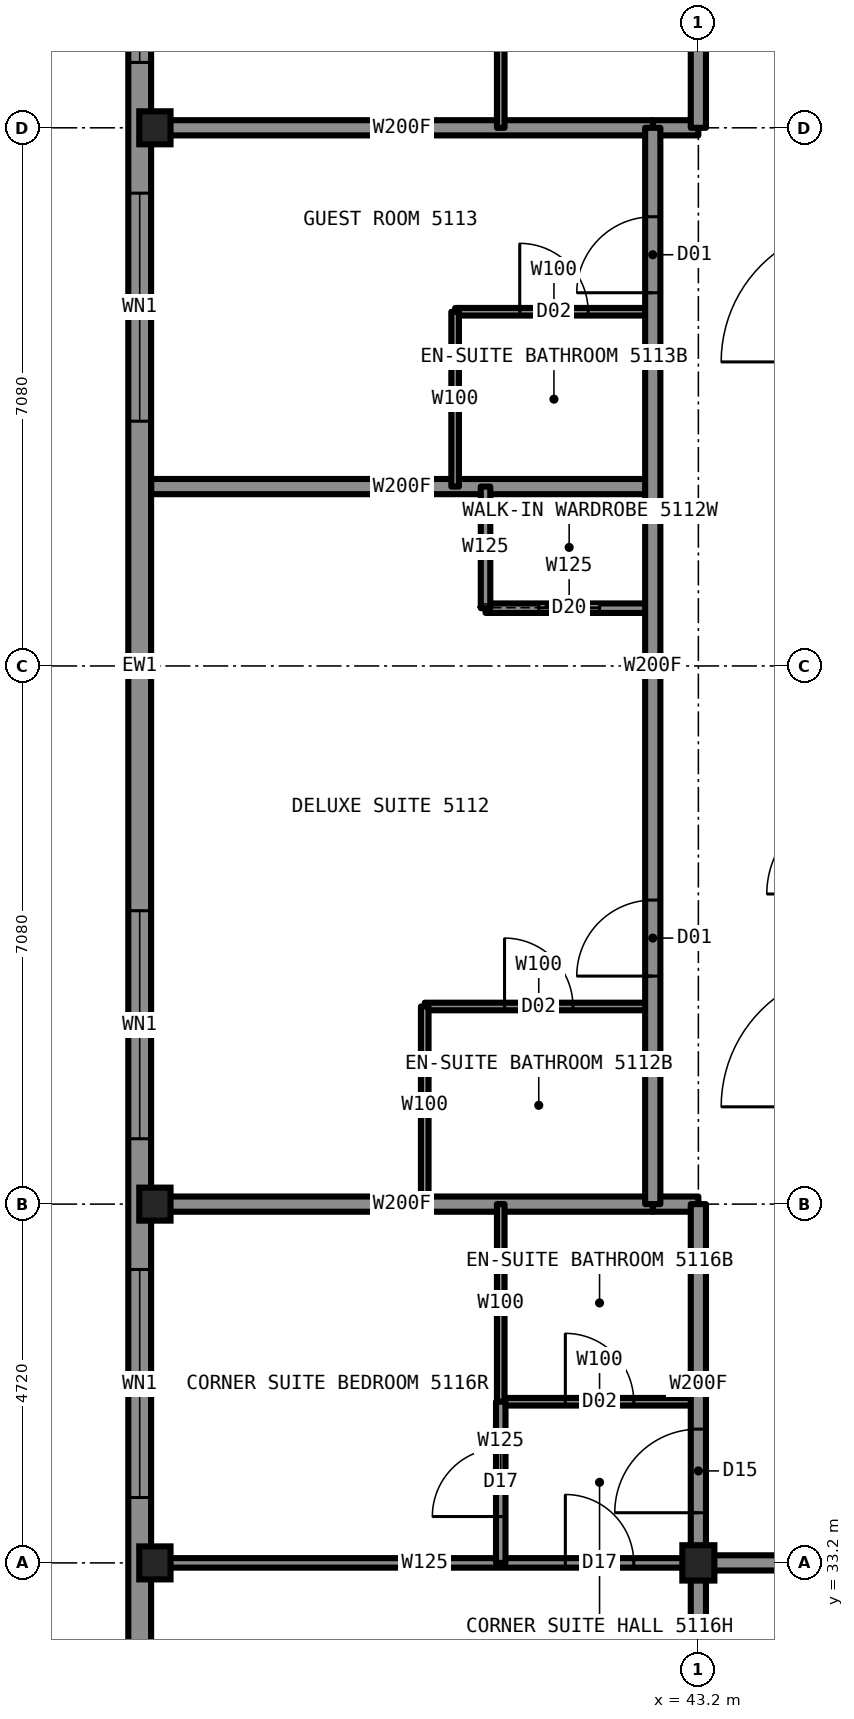
"""IFC4 building model, lengths in metres.
Left out: names, types, materials, properties, quantities, classifications, styles, units other than length and angle.
Written with IfcOpenShell. Run it as: python <this file> out.ifc"""

import sys

from ifc_helpers import new_model, si_unit, direction, frame, frame_2d, origin, origin_2d, place, context, subcontext, project, spatial, rectangle, i_section, extrude, element, fill, save


model = new_model("IFC4")
c1 = context("Model", 3, precision=1e-05, world=origin(), true_north=direction((0.0, 1.0)))
c2 = subcontext(c1, "Body", "Model", "MODEL_VIEW")
j1 = project(units=[si_unit("LENGTHUNIT", "METRE"), si_unit("PLANEANGLEUNIT", "RADIAN")], contexts=[c1])
p1 = place(None, origin())
s1 = spatial("IfcSite", under=j1, at=p1, CompositionType="ELEMENT")
p2 = place(p1, origin())
s2 = spatial("IfcBuilding", under=s1, at=p2, CompositionType="ELEMENT")
p3 = place(p2, frame((0.0, 0.0, 182.8)))
s3 = spatial("IfcBuildingStorey", under=s2, at=p3, CompositionType="ELEMENT", Elevation=182.8)
for number, where, z_axis, x_axis in (
    (1, (36.05, 33.2, 0.0), (0.0, 0.0, 1.0), (1.0, 0.0, 0.0)),
    (2, (36.05, 37.92, 0.0), (0.0, 0.0, 1.0), (1.0, 0.0, 0.0)),
    (3, (36.05, 52.08, 0.0), (0.0, 0.0, 1.0), (1.0, 0.0, 0.0)),
):
    element("IfcColumn", number, at=place(p3, frame(where, z_axis=z_axis, x_axis=x_axis)), inside=s3, PredefinedType="COLUMN", context=c2, shape_type="SweptSolid", body=[
        extrude(i_section(OverallWidth=0.411, OverallDepth=0.434, WebThickness=0.036, FlangeThickness=0.057, at=origin_2d()), origin(), (0.0, 0.0, 1.0), 3.5),
    ])
p4 = place(p3, frame((43.2, 33.2, 0.0), z_axis=(0.0, 0.0, 1.0), x_axis=(1.0, 0.0, 0.0)))
e4 = element("IfcColumn", 4, at=p4, inside=s3, PredefinedType="COLUMN", context=c2, shape_type="SweptSolid", body=[
    extrude(i_section(OverallWidth=0.422, OverallDepth=0.465, WebThickness=0.045, FlangeThickness=0.073, at=origin_2d()), origin(), (0.0, 0.0, 1.0), 3.5),
])
p5 = place(p3, frame((43.2, 33.2, 0.0), z_axis=(0.0, 0.0, 1.0), x_axis=(1.0, 0.0, 0.0)))
e5 = element("IfcWall", 5, at=p5, inside=s3, PredefinedType="PARTITIONING", context=c2, shape_type="SweptSolid", body=[
    extrude(rectangle(XDim=23.6, YDim=0.2, at=frame_2d((11.8, 0.0))), origin(), (0.0, 0.0, 1.0), 3.33),
])
p6 = place(p5, frame((3.0, 0.0, 0.0)))
e6 = element("IfcOpeningElement", 6, at=p6, cuts=e5, PredefinedType="OPENING", context=c2, shape_type="SweptSolid", body=[
    extrude(rectangle(XDim=1.0, YDim=2.2, at=frame_2d((0.5, 1.1))), frame((0.0, 0.11, 0.0), z_axis=(0.0, -1.0, 0.0), x_axis=(1.0, 0.0, 0.0)), (0.0, 0.0, 1.0), 0.22),
])
p7 = place(p5, frame((11.99, 0.0, 0.0)))
e7 = element("IfcOpeningElement", 7, at=p7, cuts=e5, PredefinedType="OPENING", context=c2, shape_type="SweptSolid", body=[
    extrude(rectangle(XDim=1.0, YDim=2.2, at=frame_2d((0.5, 1.1))), frame((0.0, 0.11, 0.0), z_axis=(0.0, -1.0, 0.0), x_axis=(1.0, 0.0, 0.0)), (0.0, 0.0, 1.0), 0.22),
])
p8 = place(p5, frame((16.71, 0.0, 0.0)))
e8 = element("IfcOpeningElement", 8, at=p8, cuts=e5, PredefinedType="OPENING", context=c2, shape_type="SweptSolid", body=[
    extrude(rectangle(XDim=1.0, YDim=2.2, at=frame_2d((0.5, 1.1))), frame((0.0, 0.11, 0.0), z_axis=(0.0, -1.0, 0.0), x_axis=(1.0, 0.0, 0.0)), (0.0, 0.0, 1.0), 0.22),
])
p9 = place(p5, frame((19.28, 0.0, 0.0)))
e9 = element("IfcOpeningElement", 9, at=p9, cuts=e5, PredefinedType="OPENING", context=c2, shape_type="SweptSolid", body=[
    extrude(rectangle(XDim=1.0, YDim=2.2, at=frame_2d((0.5, 1.1))), frame((0.0, 0.11, 0.0), z_axis=(0.0, -1.0, 0.0), x_axis=(1.0, 0.0, 0.0)), (0.0, 0.0, 1.0), 0.22),
])
p10 = place(p3, frame((36.0, 33.2, 0.0), z_axis=(0.0, 0.0, 1.0), x_axis=(1.0, 0.0, 0.0)))
e10 = element("IfcWall", 10, at=p10, inside=s3, PredefinedType="PARTITIONING", context=c2, shape_type="SweptSolid", body=[
    extrude(rectangle(XDim=7.2, YDim=0.125, at=frame_2d((3.6, 0.0))), origin(), (0.0, 0.0, 1.0), 2.573),
])
p11 = place(p10, frame((5.45, 0.0, 0.0)))
e11 = element("IfcOpeningElement", 11, at=p11, cuts=e10, PredefinedType="OPENING", context=c2, shape_type="SweptSolid", body=[
    extrude(rectangle(XDim=0.9, YDim=2.2, at=frame_2d((0.45, 1.1))), frame((0.0, 0.073, 0.0), z_axis=(0.0, -1.0, 0.0), x_axis=(1.0, 0.0, 0.0)), (0.0, 0.0, 1.0), 0.145),
])
p12 = place(p3, frame((39.6, 40.52, 0.0), z_axis=(0.0, 0.0, 1.0), x_axis=(1.0, 0.0, 0.0)))
e12 = element("IfcWall", 12, at=p12, inside=s3, PredefinedType="PARTITIONING", context=c2, shape_type="SweptSolid", body=[
    extrude(rectangle(XDim=3.0, YDim=0.1, at=frame_2d((1.5, 0.0))), origin(), (0.0, 0.0, 1.0), 3.33),
])
p13 = place(p12, frame((1.05, 0.0, 0.0)))
e13 = element("IfcOpeningElement", 13, at=p13, cuts=e12, PredefinedType="OPENING", context=c2, shape_type="SweptSolid", body=[
    extrude(rectangle(XDim=0.9, YDim=2.1, at=frame_2d((0.45, 1.05))), frame((0.0, 0.06, 0.0), z_axis=(0.0, -1.0, 0.0), x_axis=(1.0, 0.0, 0.0)), (0.0, 0.0, 1.0), 0.12),
])
p14 = place(p3, frame((42.6, 37.92, 0.0), z_axis=(0.0, 0.0, 1.0), x_axis=(1.0, 0.0, 0.0)))
e14 = element("IfcWall", 14, at=p14, inside=s3, PredefinedType="PARTITIONING", context=c2, shape_type="SweptSolid", body=[
    extrude(rectangle(XDim=0.6, YDim=0.2, at=frame_2d((0.3, 0.0))), origin(), (0.0, 0.0, 1.0), 2.573),
])
p15 = place(p3, frame((36.0, 37.92, 0.0), z_axis=(0.0, 0.0, 1.0), x_axis=(1.0, 0.0, 0.0)))
e15 = element("IfcWall", 15, at=p15, inside=s3, PredefinedType="PARTITIONING", context=c2, shape_type="SweptSolid", body=[
    extrude(rectangle(XDim=6.6, YDim=0.2, at=frame_2d((3.3, 0.0))), origin(), (0.0, 0.0, 1.0), 2.573),
])
p16 = place(p3, frame((40.6, 35.32, 0.0), z_axis=(0.0, 0.0, 1.0), x_axis=(1.0, 0.0, 0.0)))
e16 = element("IfcWall", 16, at=p16, inside=s3, PredefinedType="PARTITIONING", context=c2, shape_type="SweptSolid", body=[
    extrude(rectangle(XDim=2.6, YDim=0.1, at=frame_2d((1.3, 0.0))), origin(), (0.0, 0.0, 1.0), 3.33),
])
p17 = place(p16, frame((0.85, 0.0, 0.0)))
e17 = element("IfcOpeningElement", 17, at=p17, cuts=e16, PredefinedType="OPENING", context=c2, shape_type="SweptSolid", body=[
    extrude(rectangle(XDim=0.9, YDim=2.1, at=frame_2d((0.45, 1.05))), frame((0.0, 0.06, 0.0), z_axis=(0.0, -1.0, 0.0), x_axis=(1.0, 0.0, 0.0)), (0.0, 0.0, 1.0), 0.12),
])
p18 = place(p3, frame((40.4, 45.76, 0.0), z_axis=(0.0, 0.0, 1.0), x_axis=(1.0, 0.0, 0.0)))
e18 = element("IfcWall", 18, at=p18, inside=s3, PredefinedType="PARTITIONING", context=c2, shape_type="SweptSolid", body=[
    extrude(rectangle(XDim=2.2, YDim=0.125, at=frame_2d((1.1, 0.0))), origin(), (0.0, 0.0, 1.0), 3.33),
])
p19 = place(p18, frame((0.7, 0.0, 0.0)))
e19 = element("IfcOpeningElement", 19, at=p19, cuts=e18, PredefinedType="OPENING", context=c2, shape_type="SweptSolid", body=[
    extrude(rectangle(XDim=0.8, YDim=2.1, at=frame_2d((0.4, 1.05))), frame((0.0, 0.073, 0.0), z_axis=(0.0, -1.0, 0.0), x_axis=(1.0, 0.0, 0.0)), (0.0, 0.0, 1.0), 0.145),
])
p20 = place(p3, frame((36.0, 47.36, 0.0), z_axis=(0.0, 0.0, 1.0), x_axis=(1.0, 0.0, 0.0)))
e20 = element("IfcWall", 20, at=p20, inside=s3, PredefinedType="PARTITIONING", context=c2, shape_type="SweptSolid", body=[
    extrude(rectangle(XDim=6.6, YDim=0.2, at=frame_2d((3.3, 0.0))), origin(), (0.0, 0.0, 1.0), 2.73),
])
p21 = place(p3, frame((40.0, 49.66, 0.0), z_axis=(0.0, 0.0, 1.0), x_axis=(1.0, 0.0, 0.0)))
e21 = element("IfcWall", 21, at=p21, inside=s3, PredefinedType="PARTITIONING", context=c2, shape_type="SweptSolid", body=[
    extrude(rectangle(XDim=2.6, YDim=0.1, at=frame_2d((1.3, 0.0))), origin(), (0.0, 0.0, 1.0), 2.73),
])
p22 = place(p21, frame((0.85, 0.0, 0.0)))
e22 = element("IfcOpeningElement", 22, at=p22, cuts=e21, PredefinedType="OPENING", context=c2, shape_type="SweptSolid", body=[
    extrude(rectangle(XDim=0.9, YDim=2.1, at=frame_2d((0.45, 1.05))), frame((0.0, 0.06, 0.0), z_axis=(0.0, -1.0, 0.0), x_axis=(1.0, 0.0, 0.0)), (0.0, 0.0, 1.0), 0.12),
])
p23 = place(p3, frame((42.6, 52.08, 0.0), z_axis=(0.0, 0.0, 1.0), x_axis=(1.0, 0.0, 0.0)))
e23 = element("IfcWall", 23, at=p23, inside=s3, PredefinedType="PARTITIONING", context=c2, shape_type="SweptSolid", body=[
    extrude(rectangle(XDim=0.6, YDim=0.2, at=frame_2d((0.3, 0.0))), origin(), (0.0, 0.0, 1.0), 2.573),
])
p24 = place(p3, frame((36.0, 52.08, 0.0), z_axis=(0.0, 0.0, 1.0), x_axis=(1.0, 0.0, 0.0)))
e24 = element("IfcWall", 24, at=p24, inside=s3, PredefinedType="PARTITIONING", context=c2, shape_type="SweptSolid", body=[
    extrude(rectangle(XDim=6.6, YDim=0.2, at=frame_2d((3.3, 0.0))), origin(), (0.0, 0.0, 1.0), 2.573),
])
p25 = place(p3, frame((43.2, 33.2, 0.0), z_axis=(0.0, 0.0, 1.0), x_axis=(0.0, 1.0, 0.0)))
e25 = element("IfcWall", 25, at=p25, inside=s3, PredefinedType="PARTITIONING", context=c2, shape_type="SweptSolid", body=[
    extrude(rectangle(XDim=4.72, YDim=0.2, at=frame_2d((2.36, 0.0))), origin(), (0.0, 0.0, 1.0), 3.33),
])
p26 = place(p25, frame((0.66, 0.0, 0.0)))
e26 = element("IfcOpeningElement", 26, at=p26, cuts=e25, PredefinedType="OPENING", context=c2, shape_type="SweptSolid", body=[
    extrude(rectangle(XDim=1.1, YDim=2.2, at=frame_2d((0.55, 1.1))), frame((0.0, 0.11, 0.0), z_axis=(0.0, -1.0, 0.0), x_axis=(1.0, 0.0, 0.0)), (0.0, 0.0, 1.0), 0.22),
])
p27 = place(p3, frame((43.2, 52.08, 0.0), z_axis=(0.0, 0.0, 1.0), x_axis=(0.0, 1.0, 0.0)))
e27 = element("IfcWall", 27, at=p27, inside=s3, PredefinedType="PARTITIONING", context=c2, shape_type="SweptSolid", body=[
    extrude(rectangle(XDim=4.7, YDim=0.2, at=frame_2d((2.35, 0.0))), origin(), (0.0, 0.0, 1.0), 3.33),
])
p28 = place(p27, frame((3.17, 0.0, 0.0)))
e28 = element("IfcOpeningElement", 28, at=p28, cuts=e27, PredefinedType="OPENING", context=c2, shape_type="SweptSolid", body=[
    extrude(rectangle(XDim=1.1, YDim=2.2, at=frame_2d((0.55, 1.1))), frame((0.0, 0.11, 0.0), z_axis=(0.0, -1.0, 0.0), x_axis=(1.0, 0.0, 0.0)), (0.0, 0.0, 1.0), 0.22),
])
p29 = place(p3, frame((43.2, 26.0, 0.0), z_axis=(0.0, 0.0, 1.0), x_axis=(0.0, 1.0, 0.0)))
e29 = element("IfcWall", 29, at=p29, inside=s3, PredefinedType="PARTITIONING", context=c2, shape_type="SweptSolid", body=[
    extrude(rectangle(XDim=7.2, YDim=0.2, at=frame_2d((3.6, 0.0))), origin(), (0.0, 0.0, 1.0), 2.573),
])
p30 = place(p3, frame((42.6, 37.92, 0.0), z_axis=(0.0, 0.0, 1.0), x_axis=(0.0, 1.0, 0.0)))
e30 = element("IfcWall", 30, at=p30, inside=s3, PredefinedType="PARTITIONING", context=c2, shape_type="SweptSolid", body=[
    extrude(rectangle(XDim=14.16, YDim=0.2, at=frame_2d((7.08, 0.0))), origin(), (0.0, 0.0, 1.0), 3.33),
])
p31 = place(p30, frame((3.0, 0.0, 0.0)))
e31 = element("IfcOpeningElement", 31, at=p31, cuts=e30, PredefinedType="OPENING", context=c2, shape_type="SweptSolid", body=[
    extrude(rectangle(XDim=1.0, YDim=2.2, at=frame_2d((0.5, 1.1))), frame((0.0, 0.11, 0.0), z_axis=(0.0, -1.0, 0.0), x_axis=(1.0, 0.0, 0.0)), (0.0, 0.0, 1.0), 0.22),
])
p32 = place(p30, frame((11.99, 0.0, 0.0)))
e32 = element("IfcOpeningElement", 32, at=p32, cuts=e30, PredefinedType="OPENING", context=c2, shape_type="SweptSolid", body=[
    extrude(rectangle(XDim=1.0, YDim=2.2, at=frame_2d((0.5, 1.1))), frame((0.0, 0.11, 0.0), z_axis=(0.0, -1.0, 0.0), x_axis=(1.0, 0.0, 0.0)), (0.0, 0.0, 1.0), 0.22),
])
for number, where, z_axis, x_axis in (
    (33, (40.6, 35.32, 0.0), (0.0, 0.0, 1.0), (0.0, 1.0, 0.0)),
    (34, (40.6, 52.08, 0.0), (0.0, 0.0, 1.0), (0.0, 1.0, 0.0)),
):
    element("IfcWall", number, at=place(p3, frame(where, z_axis=z_axis, x_axis=x_axis)), inside=s3, PredefinedType="PARTITIONING", context=c2, shape_type="SweptSolid", body=[
        extrude(rectangle(XDim=2.6, YDim=0.1, at=frame_2d((1.3, 0.0))), origin(), (0.0, 0.0, 1.0), 3.33),
    ])
p33 = place(p3, frame((40.6, 33.2, 0.0), z_axis=(0.0, 0.0, 1.0), x_axis=(0.0, 1.0, 0.0)))
e35 = element("IfcWall", 35, at=p33, inside=s3, PredefinedType="PARTITIONING", context=c2, shape_type="SweptSolid", body=[
    extrude(rectangle(XDim=2.12, YDim=0.125, at=frame_2d((1.06, 0.0))), origin(), (0.0, 0.0, 1.0), 3.33),
])
p34 = place(p33, frame((0.61, 0.0, 0.0)))
e36 = element("IfcOpeningElement", 36, at=p34, cuts=e35, PredefinedType="OPENING", context=c2, shape_type="SweptSolid", body=[
    extrude(rectangle(XDim=0.9, YDim=2.2, at=frame_2d((0.45, 1.1))), frame((0.0, 0.073, 0.0), z_axis=(0.0, -1.0, 0.0), x_axis=(1.0, 0.0, 0.0)), (0.0, 0.0, 1.0), 0.145),
])
p35 = place(p3, frame((40.4, 45.76, 0.0), z_axis=(0.0, 0.0, 1.0), x_axis=(0.0, 1.0, 0.0)))
e37 = element("IfcWall", 37, at=p35, inside=s3, PredefinedType="PARTITIONING", context=c2, shape_type="SweptSolid", body=[
    extrude(rectangle(XDim=1.6, YDim=0.125, at=frame_2d((0.8, 0.0))), origin(), (0.0, 0.0, 1.0), 3.33),
])
p36 = place(p3, frame((40.0, 47.36, 0.0), z_axis=(0.0, 0.0, 1.0), x_axis=(0.0, 1.0, 0.0)))
e38 = element("IfcWall", 38, at=p36, inside=s3, PredefinedType="PARTITIONING", context=c2, shape_type="SweptSolid", body=[
    extrude(rectangle(XDim=2.3, YDim=0.1, at=frame_2d((1.15, 0.0))), origin(), (0.0, 0.0, 1.0), 3.33),
])
p37 = place(p3, frame((39.6, 37.92, 0.0), z_axis=(0.0, 0.0, 1.0), x_axis=(0.0, 1.0, 0.0)))
e39 = element("IfcWall", 39, at=p37, inside=s3, PredefinedType="PARTITIONING", context=c2, shape_type="SweptSolid", body=[
    extrude(rectangle(XDim=2.6, YDim=0.1, at=frame_2d((1.3, 0.0))), origin(), (0.0, 0.0, 1.0), 3.33),
])
p38 = place(p3, frame((35.85, 58.8, 0.0), z_axis=(0.0, 0.0, 1.0), x_axis=(0.0, -1.0, 0.0)))
e40 = element("IfcWall", 40, at=p38, inside=s3, PredefinedType="SOLIDWALL", context=c2, shape_type="SweptSolid", body=[
    extrude(rectangle(XDim=27.6, YDim=0.3, at=frame_2d((13.8, 0.0))), origin(), (0.0, 0.0, 1.0), 2.83),
])
p39 = place(p38, frame((2.86, 0.0, 0.3)))
e41 = element("IfcOpeningElement", 41, at=p39, cuts=e40, PredefinedType="OPENING", context=c2, shape_type="SweptSolid", body=[
    extrude(rectangle(XDim=3.0, YDim=2.0, at=frame_2d((1.5, 1.0))), frame((0.0, 0.16, 0.0), z_axis=(0.0, -1.0, 0.0), x_axis=(1.0, 0.0, 0.0)), (0.0, 0.0, 1.0), 0.32),
])
p40 = place(p38, frame((9.88, 0.0, 0.3)))
e42 = element("IfcOpeningElement", 42, at=p40, cuts=e40, PredefinedType="OPENING", context=c2, shape_type="SweptSolid", body=[
    extrude(rectangle(XDim=0.7, YDim=1.1, at=frame_2d((0.35, 0.55))), frame((0.0, 0.16, 0.0), z_axis=(0.0, -1.0, 0.0), x_axis=(1.0, 0.0, 0.0)), (0.0, 0.0, 1.0), 0.32),
])
p41 = place(p38, frame((12.3, 0.0, 0.3)))
e43 = element("IfcOpeningElement", 43, at=p41, cuts=e40, PredefinedType="OPENING", context=c2, shape_type="SweptSolid", body=[
    extrude(rectangle(XDim=3.0, YDim=2.0, at=frame_2d((1.5, 1.0))), frame((0.0, 0.16, 0.0), z_axis=(0.0, -1.0, 0.0), x_axis=(1.0, 0.0, 0.0)), (0.0, 0.0, 1.0), 0.32),
])
p42 = place(p38, frame((17.02, 0.0, 0.3)))
e44 = element("IfcOpeningElement", 44, at=p42, cuts=e40, PredefinedType="OPENING", context=c2, shape_type="SweptSolid", body=[
    extrude(rectangle(XDim=0.7, YDim=1.1, at=frame_2d((0.35, 0.55))), frame((0.0, 0.16, 0.0), z_axis=(0.0, -1.0, 0.0), x_axis=(1.0, 0.0, 0.0)), (0.0, 0.0, 1.0), 0.32),
])
p43 = place(p38, frame((21.74, 0.0, 0.3)))
e45 = element("IfcOpeningElement", 45, at=p43, cuts=e40, PredefinedType="OPENING", context=c2, shape_type="SweptSolid", body=[
    extrude(rectangle(XDim=3.0, YDim=2.0, at=frame_2d((1.5, 1.0))), frame((0.0, 0.16, 0.0), z_axis=(0.0, -1.0, 0.0), x_axis=(1.0, 0.0, 0.0)), (0.0, 0.0, 1.0), 0.32),
])
p44 = place(p31, origin())
e46 = element("IfcDoor", 46, at=p44, inside=s3, OperationType="SINGLE_SWING_LEFT", PredefinedType="DOOR", context=c2, shape_type="SweptSolid", body=[
    extrude(rectangle(XDim=1.0, YDim=2.2, at=frame_2d((0.5, 1.1))), frame((0.0, 0.025, 0.0), z_axis=(0.0, -1.0, 0.0), x_axis=(1.0, 0.0, 0.0)), (0.0, 0.0, 1.0), 0.05),
])
fill(e31, e46)
p45 = place(p13, origin())
e47 = element("IfcDoor", 47, at=p45, inside=s3, OperationType="SINGLE_SWING_RIGHT", PredefinedType="DOOR", context=c2, shape_type="SweptSolid", body=[
    extrude(rectangle(XDim=0.9, YDim=2.1, at=frame_2d((0.45, 1.05))), frame((0.0, 0.025, 0.0), z_axis=(0.0, -1.0, 0.0), x_axis=(1.0, 0.0, 0.0)), (0.0, 0.0, 1.0), 0.05),
])
fill(e13, e47)
p46 = place(p19, origin())
e48 = element("IfcDoor", 48, at=p46, inside=s3, OperationType="SLIDING_TO_LEFT", PredefinedType="DOOR", context=c2, shape_type="SweptSolid", body=[
    extrude(rectangle(XDim=0.8, YDim=2.1, at=frame_2d((0.4, 1.05))), frame((0.0, 0.025, 0.0), z_axis=(0.0, -1.0, 0.0), x_axis=(1.0, 0.0, 0.0)), (0.0, 0.0, 1.0), 0.05),
])
fill(e19, e48)
p47 = place(p32, origin())
e49 = element("IfcDoor", 49, at=p47, inside=s3, OperationType="SINGLE_SWING_LEFT", PredefinedType="DOOR", context=c2, shape_type="SweptSolid", body=[
    extrude(rectangle(XDim=1.0, YDim=2.2, at=frame_2d((0.5, 1.1))), frame((0.0, 0.025, 0.0), z_axis=(0.0, -1.0, 0.0), x_axis=(1.0, 0.0, 0.0)), (0.0, 0.0, 1.0), 0.05),
])
fill(e32, e49)
p48 = place(p22, origin())
e50 = element("IfcDoor", 50, at=p48, inside=s3, OperationType="SINGLE_SWING_RIGHT", PredefinedType="DOOR", context=c2, shape_type="SweptSolid", body=[
    extrude(rectangle(XDim=0.9, YDim=2.1, at=frame_2d((0.45, 1.05))), frame((0.0, 0.025, 0.0), z_axis=(0.0, -1.0, 0.0), x_axis=(1.0, 0.0, 0.0)), (0.0, 0.0, 1.0), 0.05),
])
fill(e22, e50)
p49 = place(p11, origin())
e51 = element("IfcDoor", 51, at=p49, inside=s3, OperationType="SINGLE_SWING_LEFT", PredefinedType="DOOR", context=c2, shape_type="SweptSolid", body=[
    extrude(rectangle(XDim=0.9, YDim=2.2, at=frame_2d((0.45, 1.1))), frame((0.0, 0.025, 0.0), z_axis=(0.0, -1.0, 0.0), x_axis=(1.0, 0.0, 0.0)), (0.0, 0.0, 1.0), 0.05),
])
fill(e11, e51)
p50 = place(p17, origin())
e52 = element("IfcDoor", 52, at=p50, inside=s3, OperationType="SINGLE_SWING_RIGHT", PredefinedType="DOOR", context=c2, shape_type="SweptSolid", body=[
    extrude(rectangle(XDim=0.9, YDim=2.1, at=frame_2d((0.45, 1.05))), frame((0.0, 0.025, 0.0), z_axis=(0.0, -1.0, 0.0), x_axis=(1.0, 0.0, 0.0)), (0.0, 0.0, 1.0), 0.05),
])
fill(e17, e52)
p51 = place(p26, origin())
e53 = element("IfcDoor", 53, at=p51, inside=s3, OperationType="SINGLE_SWING_LEFT", PredefinedType="DOOR", context=c2, shape_type="SweptSolid", body=[
    extrude(rectangle(XDim=1.1, YDim=2.2, at=frame_2d((0.55, 1.1))), frame((0.0, 0.025, 0.0), z_axis=(0.0, -1.0, 0.0), x_axis=(1.0, 0.0, 0.0)), (0.0, 0.0, 1.0), 0.05),
])
fill(e26, e53)
p52 = place(p34, origin())
e54 = element("IfcDoor", 54, at=p52, inside=s3, OperationType="SINGLE_SWING_LEFT", PredefinedType="DOOR", context=c2, shape_type="SweptSolid", body=[
    extrude(rectangle(XDim=0.9, YDim=2.2, at=frame_2d((0.45, 1.1))), frame((0.0, 0.025, 0.0), z_axis=(0.0, -1.0, 0.0), x_axis=(1.0, 0.0, 0.0)), (0.0, 0.0, 1.0), 0.05),
])
fill(e36, e54)
p53 = place(p39, origin())
e55 = element("IfcWindow", 55, at=p53, inside=s3, PartitioningType="SINGLE_PANEL", PredefinedType="WINDOW", context=c2, shape_type="SweptSolid", body=[
    extrude(rectangle(XDim=3.0, YDim=2.0, at=frame_2d((1.5, 1.0))), frame((0.0, 0.13, 0.0), z_axis=(0.0, -1.0, 0.0), x_axis=(1.0, 0.0, 0.0)), (0.0, 0.0, 1.0), 0.06),
])
fill(e41, e55)
p54 = place(p40, origin())
e56 = element("IfcWindow", 56, at=p54, inside=s3, PartitioningType="SINGLE_PANEL", PredefinedType="WINDOW", context=c2, shape_type="SweptSolid", body=[
    extrude(rectangle(XDim=0.7, YDim=1.1, at=frame_2d((0.35, 0.55))), frame((0.0, 0.13, 0.0), z_axis=(0.0, -1.0, 0.0), x_axis=(1.0, 0.0, 0.0)), (0.0, 0.0, 1.0), 0.06),
])
fill(e42, e56)
p55 = place(p41, origin())
e57 = element("IfcWindow", 57, at=p55, inside=s3, PartitioningType="SINGLE_PANEL", PredefinedType="WINDOW", context=c2, shape_type="SweptSolid", body=[
    extrude(rectangle(XDim=3.0, YDim=2.0, at=frame_2d((1.5, 1.0))), frame((0.0, 0.13, 0.0), z_axis=(0.0, -1.0, 0.0), x_axis=(1.0, 0.0, 0.0)), (0.0, 0.0, 1.0), 0.06),
])
fill(e43, e57)
p56 = place(p42, origin())
e58 = element("IfcWindow", 58, at=p56, inside=s3, PartitioningType="SINGLE_PANEL", PredefinedType="WINDOW", context=c2, shape_type="SweptSolid", body=[
    extrude(rectangle(XDim=0.7, YDim=1.1, at=frame_2d((0.35, 0.55))), frame((0.0, 0.13, 0.0), z_axis=(0.0, -1.0, 0.0), x_axis=(1.0, 0.0, 0.0)), (0.0, 0.0, 1.0), 0.06),
])
fill(e44, e58)
p57 = place(p43, origin())
e59 = element("IfcWindow", 59, at=p57, inside=s3, PartitioningType="SINGLE_PANEL", PredefinedType="WINDOW", context=c2, shape_type="SweptSolid", body=[
    extrude(rectangle(XDim=3.0, YDim=2.0, at=frame_2d((1.5, 1.0))), frame((0.0, 0.13, 0.0), z_axis=(0.0, -1.0, 0.0), x_axis=(1.0, 0.0, 0.0)), (0.0, 0.0, 1.0), 0.06),
])
fill(e45, e59)
save(model, sys.argv[1])
